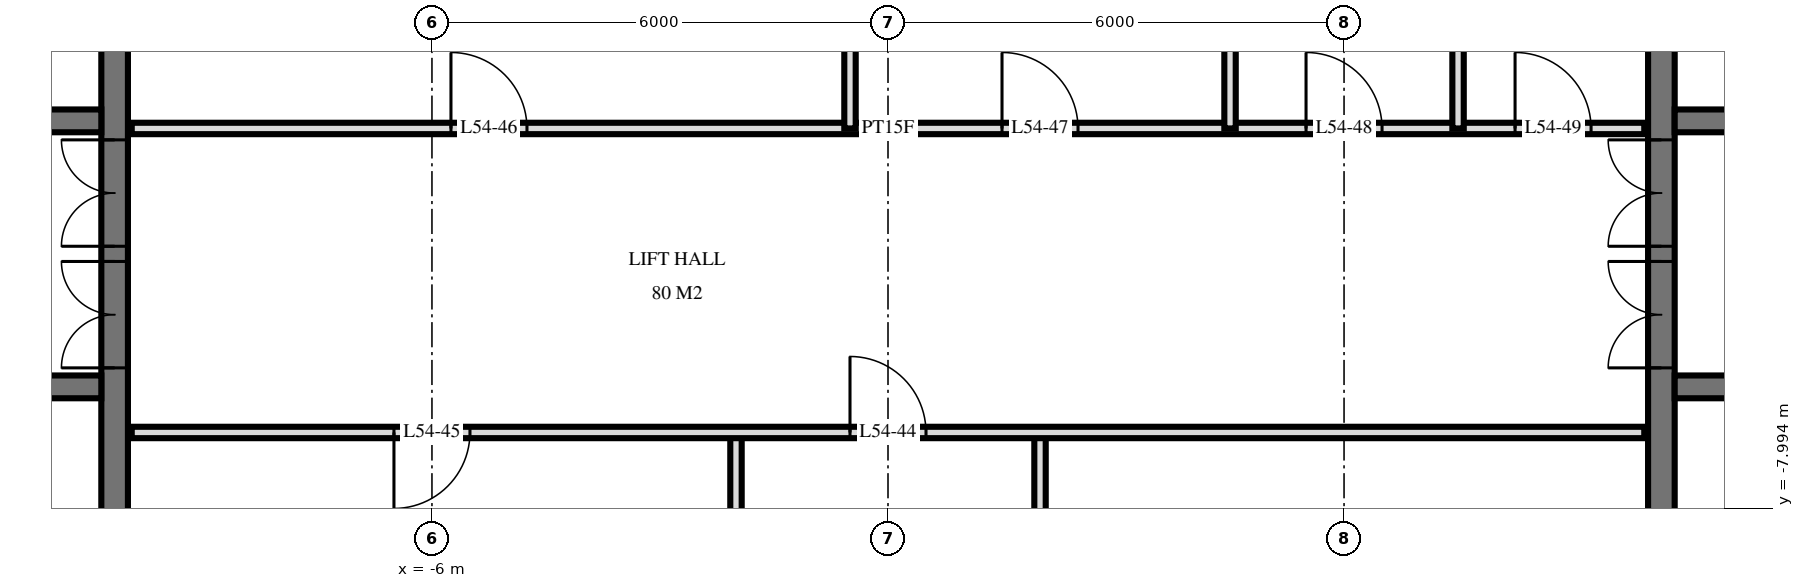
"""IFC4 building model, lengths in metres.
Left out: names, types, materials, properties, quantities, classifications, styles, units other than length and angle.
Written with IfcOpenShell. Run it as: python <this file> out.ifc"""

import sys

from ifc_helpers import new_model, si_unit, direction, frame, frame_2d, origin, place, context, subcontext, project, spatial, rectangle, extrude, element, fill, save


model = new_model("IFC4")
c1 = context("Model", 3, precision=1e-05, world=origin(), true_north=direction((0.0, 1.0)))
c2 = subcontext(c1, "Body", "Model", "MODEL_VIEW")
j1 = project(units=[si_unit("LENGTHUNIT", "METRE"), si_unit("PLANEANGLEUNIT", "RADIAN")], contexts=[c1])
p1 = place(None, origin())
s1 = spatial("IfcSite", under=j1, at=p1, CompositionType="ELEMENT")
p2 = place(p1, origin())
s2 = spatial("IfcBuilding", under=s1, at=p2, CompositionType="ELEMENT")
p3 = place(p2, frame((0.0, 0.0, 208.1)))
s3 = spatial("IfcBuildingStorey", under=s2, at=p3, CompositionType="ELEMENT", Elevation=208.1)
p4 = place(p3, frame((-10.175, -14.55, 0.0), z_axis=(0.0, 0.0, 1.0), x_axis=(0.0, 1.0, 0.0)))
e1 = element("IfcWall", 1, at=p4, inside=s3, PredefinedType="SHEAR", context=c2, shape_type="SweptSolid", body=[
    extrude(rectangle(XDim=14.1, YDim=0.35, at=frame_2d((7.05, 0.0))), origin(), (0.0, 0.0, 1.0), 3.5),
])
p5 = place(p4, frame((8.4, 0.0, 0.0)))
e2 = element("IfcOpeningElement", 2, at=p5, cuts=e1, PredefinedType="OPENING", context=c2, shape_type="SweptSolid", body=[
    extrude(rectangle(XDim=1.4, YDim=2.4, at=frame_2d((0.7, 1.2))), frame((0.0, 0.185, 0.0), z_axis=(0.0, -1.0, 0.0), x_axis=(1.0, 0.0, 0.0)), (0.0, 0.0, 1.0), 0.37),
])
p6 = place(p4, frame((10.0, 0.0, 0.0)))
e3 = element("IfcOpeningElement", 3, at=p6, cuts=e1, PredefinedType="OPENING", context=c2, shape_type="SweptSolid", body=[
    extrude(rectangle(XDim=1.4, YDim=2.4, at=frame_2d((0.7, 1.2))), frame((0.0, 0.185, 0.0), z_axis=(0.0, -1.0, 0.0), x_axis=(1.0, 0.0, 0.0)), (0.0, 0.0, 1.0), 0.37),
])
p7 = place(p4, frame((4.0, 0.0, 0.0)))
e4 = element("IfcOpeningElement", 4, at=p7, cuts=e1, PredefinedType="OPENING", context=c2, shape_type="SweptSolid", body=[
    extrude(rectangle(XDim=1.2, YDim=2.1, at=frame_2d((0.6, 1.05))), frame((0.0, 0.185, 0.0), z_axis=(0.0, -1.0, 0.0), x_axis=(1.0, 0.0, 0.0)), (0.0, 0.0, 1.0), 0.37),
])
p8 = place(p3, frame((-24.05, -2.9, 0.0), z_axis=(0.0, 0.0, 1.0), x_axis=(1.0, 0.0, 0.0)))
e5 = element("IfcWall", 5, at=p8, inside=s3, PredefinedType="SHEAR", context=c2, shape_type="SweptSolid", body=[
    extrude(rectangle(XDim=13.7, YDim=0.3, at=frame_2d((6.85, 0.0))), origin(), (0.0, 0.0, 1.0), 3.5),
])
p9 = place(p8, frame((0.55, 0.0, 0.0)))
e6 = element("IfcOpeningElement", 6, at=p9, cuts=e5, PredefinedType="OPENING", context=c2, shape_type="SweptSolid", body=[
    extrude(rectangle(XDim=1.1, YDim=2.1, at=frame_2d((0.55, 1.05))), frame((0.0, 0.16, 0.0), z_axis=(0.0, -1.0, 0.0), x_axis=(1.0, 0.0, 0.0)), (0.0, 0.0, 1.0), 0.32),
])
p10 = place(p8, frame((6.863, 0.0, 0.0)))
e7 = element("IfcOpeningElement", 7, at=p10, cuts=e5, PredefinedType="OPENING", context=c2, shape_type="SweptSolid", body=[
    extrude(rectangle(XDim=0.9, YDim=2.1, at=frame_2d((0.45, 1.05))), frame((0.0, 0.16, 0.0), z_axis=(0.0, -1.0, 0.0), x_axis=(1.0, 0.0, 0.0)), (0.0, 0.0, 1.0), 0.32),
])
p11 = place(p8, frame((5.438, 0.0, 0.0)))
e8 = element("IfcOpeningElement", 8, at=p11, cuts=e5, PredefinedType="OPENING", context=c2, shape_type="SweptSolid", body=[
    extrude(rectangle(XDim=0.9, YDim=2.1, at=frame_2d((0.45, 1.05))), frame((0.0, 0.16, 0.0), z_axis=(0.0, -1.0, 0.0), x_axis=(1.0, 0.0, 0.0)), (0.0, 0.0, 1.0), 0.32),
])
p12 = place(p8, frame((11.85, 0.0, 0.0)))
e9 = element("IfcOpeningElement", 9, at=p12, cuts=e5, PredefinedType="OPENING", context=c2, shape_type="SweptSolid", body=[
    extrude(rectangle(XDim=1.0, YDim=2.1, at=frame_2d((0.5, 1.05))), frame((0.0, 0.16, 0.0), z_axis=(0.0, -1.0, 0.0), x_axis=(1.0, 0.0, 0.0)), (0.0, 0.0, 1.0), 0.32),
])
p13 = place(p8, frame((9.562, 0.0, 0.0)))
e10 = element("IfcOpeningElement", 10, at=p13, cuts=e5, PredefinedType="OPENING", context=c2, shape_type="SweptSolid", body=[
    extrude(rectangle(XDim=1.0, YDim=2.1, at=frame_2d((0.5, 1.05))), frame((0.0, 0.16, 0.0), z_axis=(0.0, -1.0, 0.0), x_axis=(1.0, 0.0, 0.0)), (0.0, 0.0, 1.0), 0.32),
])
p14 = place(p8, frame((8.137, 0.0, 0.0)))
e11 = element("IfcOpeningElement", 11, at=p14, cuts=e5, PredefinedType="OPENING", context=c2, shape_type="SweptSolid", body=[
    extrude(rectangle(XDim=1.0, YDim=2.1, at=frame_2d((0.5, 1.05))), frame((0.0, 0.16, 0.0), z_axis=(0.0, -1.0, 0.0), x_axis=(1.0, 0.0, 0.0)), (0.0, 0.0, 1.0), 0.32),
])
p15 = place(p8, frame((3.0, 0.0, 0.0)))
e12 = element("IfcOpeningElement", 12, at=p15, cuts=e5, PredefinedType="OPENING", context=c2, shape_type="SweptSolid", body=[
    extrude(rectangle(XDim=1.0, YDim=2.1, at=frame_2d((0.5, 1.05))), frame((0.0, 0.16, 0.0), z_axis=(0.0, -1.0, 0.0), x_axis=(1.0, 0.0, 0.0)), (0.0, 0.0, 1.0), 0.32),
])
p16 = place(p3, frame((-24.05, -6.4, 0.0), z_axis=(0.0, 0.0, 1.0), x_axis=(1.0, 0.0, 0.0)))
e13 = element("IfcWall", 13, at=p16, inside=s3, PredefinedType="SHEAR", context=c2, shape_type="SweptSolid", body=[
    extrude(rectangle(XDim=13.7, YDim=0.3, at=frame_2d((6.85, 0.0))), origin(), (0.0, 0.0, 1.0), 3.5),
])
p17 = place(p16, frame((0.55, 0.0, 0.0)))
e14 = element("IfcOpeningElement", 14, at=p17, cuts=e13, PredefinedType="OPENING", context=c2, shape_type="SweptSolid", body=[
    extrude(rectangle(XDim=1.1, YDim=2.1, at=frame_2d((0.55, 1.05))), frame((0.0, 0.16, 0.0), z_axis=(0.0, -1.0, 0.0), x_axis=(1.0, 0.0, 0.0)), (0.0, 0.0, 1.0), 0.32),
])
p18 = place(p16, frame((5.8, 0.0, 0.0)))
e15 = element("IfcOpeningElement", 15, at=p18, cuts=e13, PredefinedType="OPENING", context=c2, shape_type="SweptSolid", body=[
    extrude(rectangle(XDim=1.1, YDim=2.1, at=frame_2d((0.55, 1.05))), frame((0.0, 0.16, 0.0), z_axis=(0.0, -1.0, 0.0), x_axis=(1.0, 0.0, 0.0)), (0.0, 0.0, 1.0), 0.32),
])
p19 = place(p3, frame((10.175, -14.55, 0.0), z_axis=(0.0, 0.0, 1.0), x_axis=(0.0, 1.0, 0.0)))
e16 = element("IfcWall", 16, at=p19, inside=s3, PredefinedType="SHEAR", context=c2, shape_type="SweptSolid", body=[
    extrude(rectangle(XDim=14.1, YDim=0.35, at=frame_2d((7.05, 0.0))), origin(), (0.0, 0.0, 1.0), 3.5),
])
p20 = place(p19, frame((8.4, 0.0, 0.0)))
e17 = element("IfcOpeningElement", 17, at=p20, cuts=e16, PredefinedType="OPENING", context=c2, shape_type="SweptSolid", body=[
    extrude(rectangle(XDim=1.4, YDim=2.4, at=frame_2d((0.7, 1.2))), frame((0.0, 0.185, 0.0), z_axis=(0.0, -1.0, 0.0), x_axis=(1.0, 0.0, 0.0)), (0.0, 0.0, 1.0), 0.37),
])
p21 = place(p19, frame((10.0, 0.0, 0.0)))
e18 = element("IfcOpeningElement", 18, at=p21, cuts=e16, PredefinedType="OPENING", context=c2, shape_type="SweptSolid", body=[
    extrude(rectangle(XDim=1.4, YDim=2.4, at=frame_2d((0.7, 1.2))), frame((0.0, 0.185, 0.0), z_axis=(0.0, -1.0, 0.0), x_axis=(1.0, 0.0, 0.0)), (0.0, 0.0, 1.0), 0.37),
])
p22 = place(p19, frame((4.0, 0.0, 0.0)))
e19 = element("IfcOpeningElement", 19, at=p22, cuts=e16, PredefinedType="OPENING", context=c2, shape_type="SweptSolid", body=[
    extrude(rectangle(XDim=1.2, YDim=2.1, at=frame_2d((0.6, 1.05))), frame((0.0, 0.185, 0.0), z_axis=(0.0, -1.0, 0.0), x_axis=(1.0, 0.0, 0.0)), (0.0, 0.0, 1.0), 0.37),
])
p23 = place(p3, frame((10.35, -2.9, 0.0), z_axis=(0.0, 0.0, 1.0), x_axis=(1.0, 0.0, 0.0)))
e20 = element("IfcWall", 20, at=p23, inside=s3, PredefinedType="SHEAR", context=c2, shape_type="SweptSolid", body=[
    extrude(rectangle(XDim=13.7, YDim=0.3, at=frame_2d((6.85, 0.0))), origin(), (0.0, 0.0, 1.0), 3.5),
])
p24 = place(p23, frame((12.05, 0.0, 0.0)))
e21 = element("IfcOpeningElement", 21, at=p24, cuts=e20, PredefinedType="OPENING", context=c2, shape_type="SweptSolid", body=[
    extrude(rectangle(XDim=1.1, YDim=2.1, at=frame_2d((0.55, 1.05))), frame((0.0, 0.16, 0.0), z_axis=(0.0, -1.0, 0.0), x_axis=(1.0, 0.0, 0.0)), (0.0, 0.0, 1.0), 0.32),
])
p25 = place(p23, frame((5.938, 0.0, 0.0)))
e22 = element("IfcOpeningElement", 22, at=p25, cuts=e20, PredefinedType="OPENING", context=c2, shape_type="SweptSolid", body=[
    extrude(rectangle(XDim=0.9, YDim=2.1, at=frame_2d((0.45, 1.05))), frame((0.0, 0.16, 0.0), z_axis=(0.0, -1.0, 0.0), x_axis=(1.0, 0.0, 0.0)), (0.0, 0.0, 1.0), 0.32),
])
p26 = place(p23, frame((7.363, 0.0, 0.0)))
e23 = element("IfcOpeningElement", 23, at=p26, cuts=e20, PredefinedType="OPENING", context=c2, shape_type="SweptSolid", body=[
    extrude(rectangle(XDim=0.9, YDim=2.1, at=frame_2d((0.45, 1.05))), frame((0.0, 0.16, 0.0), z_axis=(0.0, -1.0, 0.0), x_axis=(1.0, 0.0, 0.0)), (0.0, 0.0, 1.0), 0.32),
])
p27 = place(p23, frame((0.85, 0.0, 0.0)))
e24 = element("IfcOpeningElement", 24, at=p27, cuts=e20, PredefinedType="OPENING", context=c2, shape_type="SweptSolid", body=[
    extrude(rectangle(XDim=1.0, YDim=2.1, at=frame_2d((0.5, 1.05))), frame((0.0, 0.16, 0.0), z_axis=(0.0, -1.0, 0.0), x_axis=(1.0, 0.0, 0.0)), (0.0, 0.0, 1.0), 0.32),
])
p28 = place(p23, frame((3.137, 0.0, 0.0)))
e25 = element("IfcOpeningElement", 25, at=p28, cuts=e20, PredefinedType="OPENING", context=c2, shape_type="SweptSolid", body=[
    extrude(rectangle(XDim=1.0, YDim=2.1, at=frame_2d((0.5, 1.05))), frame((0.0, 0.16, 0.0), z_axis=(0.0, -1.0, 0.0), x_axis=(1.0, 0.0, 0.0)), (0.0, 0.0, 1.0), 0.32),
])
p29 = place(p23, frame((4.562, 0.0, 0.0)))
e26 = element("IfcOpeningElement", 26, at=p29, cuts=e20, PredefinedType="OPENING", context=c2, shape_type="SweptSolid", body=[
    extrude(rectangle(XDim=1.0, YDim=2.1, at=frame_2d((0.5, 1.05))), frame((0.0, 0.16, 0.0), z_axis=(0.0, -1.0, 0.0), x_axis=(1.0, 0.0, 0.0)), (0.0, 0.0, 1.0), 0.32),
])
p30 = place(p23, frame((9.7, 0.0, 0.0)))
e27 = element("IfcOpeningElement", 27, at=p30, cuts=e20, PredefinedType="OPENING", context=c2, shape_type="SweptSolid", body=[
    extrude(rectangle(XDim=1.0, YDim=2.1, at=frame_2d((0.5, 1.05))), frame((0.0, 0.16, 0.0), z_axis=(0.0, -1.0, 0.0), x_axis=(1.0, 0.0, 0.0)), (0.0, 0.0, 1.0), 0.32),
])
p31 = place(p3, frame((10.35, -6.4, 0.0), z_axis=(0.0, 0.0, 1.0), x_axis=(1.0, 0.0, 0.0)))
e28 = element("IfcWall", 28, at=p31, inside=s3, PredefinedType="SHEAR", context=c2, shape_type="SweptSolid", body=[
    extrude(rectangle(XDim=13.7, YDim=0.3, at=frame_2d((6.85, 0.0))), origin(), (0.0, 0.0, 1.0), 3.5),
])
p32 = place(p31, frame((12.05, 0.0, 0.0)))
e29 = element("IfcOpeningElement", 29, at=p32, cuts=e28, PredefinedType="OPENING", context=c2, shape_type="SweptSolid", body=[
    extrude(rectangle(XDim=1.1, YDim=2.1, at=frame_2d((0.55, 1.05))), frame((0.0, 0.16, 0.0), z_axis=(0.0, -1.0, 0.0), x_axis=(1.0, 0.0, 0.0)), (0.0, 0.0, 1.0), 0.32),
])
p33 = place(p31, frame((6.8, 0.0, 0.0)))
e30 = element("IfcOpeningElement", 30, at=p33, cuts=e28, PredefinedType="OPENING", context=c2, shape_type="SweptSolid", body=[
    extrude(rectangle(XDim=1.1, YDim=2.1, at=frame_2d((0.55, 1.05))), frame((0.0, 0.16, 0.0), z_axis=(0.0, -1.0, 0.0), x_axis=(1.0, 0.0, 0.0)), (0.0, 0.0, 1.0), 0.32),
])
for number, where, z_axis, x_axis in (
    (31, (7.5, -3.0, 0.0), (0.0, 0.0, 1.0), (0.0, 1.0, 0.0)),
    (32, (4.5, -3.0, 0.0), (0.0, 0.0, 1.0), (0.0, 1.0, 0.0)),
):
    element("IfcWall", number, at=place(p3, frame(where, z_axis=z_axis, x_axis=x_axis)), inside=s3, PredefinedType="PLUMBINGWALL", context=c2, shape_type="SweptSolid", body=[
        extrude(rectangle(XDim=4.02, YDim=0.15, at=frame_2d((2.01, 0.0))), origin(), (0.0, 0.0, 1.0), 3.22),
    ])
p34 = place(p3, frame((2.0, -11.0, 0.0), z_axis=(0.0, 0.0, 1.0), x_axis=(0.0, 1.0, 0.0)))
e33 = element("IfcWall", 33, at=p34, inside=s3, PredefinedType="PARTITIONING", context=c2, shape_type="SweptSolid", body=[
    extrude(rectangle(XDim=4.0, YDim=0.15, at=frame_2d((2.0, 0.0))), origin(), (0.0, 0.0, 1.0), 3.22),
])
p35 = place(p3, frame((-0.5, -3.0, 0.0), z_axis=(0.0, 0.0, 1.0), x_axis=(0.0, 1.0, 0.0)))
e34 = element("IfcWall", 34, at=p35, inside=s3, PredefinedType="PARTITIONING", context=c2, shape_type="SweptSolid", body=[
    extrude(rectangle(XDim=4.02, YDim=0.15, at=frame_2d((2.01, 0.0))), origin(), (0.0, 0.0, 1.0), 3.22),
])
p36 = place(p3, frame((-2.0, -11.0, 0.0), z_axis=(0.0, 0.0, 1.0), x_axis=(0.0, 1.0, 0.0)))
e35 = element("IfcWall", 35, at=p36, inside=s3, PredefinedType="PARTITIONING", context=c2, shape_type="SweptSolid", body=[
    extrude(rectangle(XDim=4.0, YDim=0.15, at=frame_2d((2.0, 0.0))), origin(), (0.0, 0.0, 1.0), 3.22),
])
p37 = place(p3, frame((-9.95, -7.0, 0.0), z_axis=(0.0, 0.0, 1.0), x_axis=(1.0, 0.0, 0.0)))
e36 = element("IfcWall", 36, at=p37, inside=s3, PredefinedType="PARTITIONING", context=c2, shape_type="SweptSolid", body=[
    extrude(rectangle(XDim=19.9, YDim=0.15, at=frame_2d((9.95, 0.0))), origin(), (0.0, 0.0, 1.0), 3.22),
])
p38 = place(p37, frame((9.45, 0.0, 0.0)))
e37 = element("IfcOpeningElement", 37, at=p38, cuts=e36, PredefinedType="OPENING", context=c2, shape_type="SweptSolid", body=[
    extrude(rectangle(XDim=1.0, YDim=2.1, at=frame_2d((0.5, 1.05))), frame((0.0, 0.085, 0.0), z_axis=(0.0, -1.0, 0.0), x_axis=(1.0, 0.0, 0.0)), (0.0, 0.0, 1.0), 0.17),
])
p39 = place(p37, frame((3.45, 0.0, 0.0)))
e38 = element("IfcOpeningElement", 38, at=p39, cuts=e36, PredefinedType="OPENING", context=c2, shape_type="SweptSolid", body=[
    extrude(rectangle(XDim=1.0, YDim=2.1, at=frame_2d((0.5, 1.05))), frame((0.0, 0.085, 0.0), z_axis=(0.0, -1.0, 0.0), x_axis=(1.0, 0.0, 0.0)), (0.0, 0.0, 1.0), 0.17),
])
p40 = place(p3, frame((-9.95, -3.0, 0.0), z_axis=(0.0, 0.0, 1.0), x_axis=(1.0, 0.0, 0.0)))
e39 = element("IfcWall", 39, at=p40, inside=s3, PredefinedType="PARTITIONING", context=c2, shape_type="SweptSolid", body=[
    extrude(rectangle(XDim=19.9, YDim=0.15, at=frame_2d((9.95, 0.0))), origin(), (0.0, 0.0, 1.0), 3.22),
])
p41 = place(p40, frame((4.2, 0.0, 0.0)))
e40 = element("IfcOpeningElement", 40, at=p41, cuts=e39, PredefinedType="OPENING", context=c2, shape_type="SweptSolid", body=[
    extrude(rectangle(XDim=1.0, YDim=2.1, at=frame_2d((0.5, 1.05))), frame((0.0, 0.085, 0.0), z_axis=(0.0, -1.0, 0.0), x_axis=(1.0, 0.0, 0.0)), (0.0, 0.0, 1.0), 0.17),
])
p42 = place(p40, frame((11.45, 0.0, 0.0)))
e41 = element("IfcOpeningElement", 41, at=p42, cuts=e39, PredefinedType="OPENING", context=c2, shape_type="SweptSolid", body=[
    extrude(rectangle(XDim=1.0, YDim=2.1, at=frame_2d((0.5, 1.05))), frame((0.0, 0.085, 0.0), z_axis=(0.0, -1.0, 0.0), x_axis=(1.0, 0.0, 0.0)), (0.0, 0.0, 1.0), 0.17),
])
p43 = place(p40, frame((15.45, 0.0, 0.0)))
e42 = element("IfcOpeningElement", 42, at=p43, cuts=e39, PredefinedType="OPENING", context=c2, shape_type="SweptSolid", body=[
    extrude(rectangle(XDim=1.0, YDim=2.1, at=frame_2d((0.5, 1.05))), frame((0.0, 0.085, 0.0), z_axis=(0.0, -1.0, 0.0), x_axis=(1.0, 0.0, 0.0)), (0.0, 0.0, 1.0), 0.17),
])
p44 = place(p40, frame((18.2, 0.0, 0.0)))
e43 = element("IfcOpeningElement", 43, at=p44, cuts=e39, PredefinedType="OPENING", context=c2, shape_type="SweptSolid", body=[
    extrude(rectangle(XDim=1.0, YDim=2.1, at=frame_2d((0.5, 1.05))), frame((0.0, 0.085, 0.0), z_axis=(0.0, -1.0, 0.0), x_axis=(1.0, 0.0, 0.0)), (0.0, 0.0, 1.0), 0.17),
])
p45 = place(p5, origin())
e44 = element("IfcDoor", 44, at=p45, inside=s3, OperationType="DOUBLE_DOOR_SINGLE_SWING", PredefinedType="DOOR", context=c2, shape_type="SweptSolid", body=[
    extrude(rectangle(XDim=1.4, YDim=2.4, at=frame_2d((0.7, 1.2))), frame((0.0, 0.025, 0.0), z_axis=(0.0, -1.0, 0.0), x_axis=(1.0, 0.0, 0.0)), (0.0, 0.0, 1.0), 0.05),
])
fill(e2, e44)
p46 = place(p6, origin())
e45 = element("IfcDoor", 45, at=p46, inside=s3, OperationType="DOUBLE_DOOR_SINGLE_SWING", PredefinedType="DOOR", context=c2, shape_type="SweptSolid", body=[
    extrude(rectangle(XDim=1.4, YDim=2.4, at=frame_2d((0.7, 1.2))), frame((0.0, 0.025, 0.0), z_axis=(0.0, -1.0, 0.0), x_axis=(1.0, 0.0, 0.0)), (0.0, 0.0, 1.0), 0.05),
])
fill(e3, e45)
p47 = place(p20, origin())
e46 = element("IfcDoor", 46, at=p47, inside=s3, OperationType="DOUBLE_DOOR_SINGLE_SWING", PredefinedType="DOOR", context=c2, shape_type="SweptSolid", body=[
    extrude(rectangle(XDim=1.4, YDim=2.4, at=frame_2d((0.7, 1.2))), frame((0.0, 0.025, 0.0), z_axis=(0.0, -1.0, 0.0), x_axis=(1.0, 0.0, 0.0)), (0.0, 0.0, 1.0), 0.05),
])
fill(e17, e46)
p48 = place(p21, origin())
e47 = element("IfcDoor", 47, at=p48, inside=s3, OperationType="DOUBLE_DOOR_SINGLE_SWING", PredefinedType="DOOR", context=c2, shape_type="SweptSolid", body=[
    extrude(rectangle(XDim=1.4, YDim=2.4, at=frame_2d((0.7, 1.2))), frame((0.0, 0.025, 0.0), z_axis=(0.0, -1.0, 0.0), x_axis=(1.0, 0.0, 0.0)), (0.0, 0.0, 1.0), 0.05),
])
fill(e18, e47)
p49 = place(p38, origin())
e48 = element("IfcDoor", 48, at=p49, inside=s3, OperationType="SINGLE_SWING_RIGHT", PredefinedType="DOOR", context=c2, shape_type="SweptSolid", body=[
    extrude(rectangle(XDim=1.0, YDim=2.1, at=frame_2d((0.5, 1.05))), frame((0.0, 0.025, 0.0), z_axis=(0.0, -1.0, 0.0), x_axis=(1.0, 0.0, 0.0)), (0.0, 0.0, 1.0), 0.05),
])
fill(e37, e48)
p50 = place(p39, frame((0.5, 0.0, 0.0), z_axis=(0.0, 0.0, 1.0), x_axis=(-1.0, 0.0, 0.0)))
e49 = element("IfcDoor", 49, at=p50, inside=s3, OperationType="SINGLE_SWING_LEFT", PredefinedType="DOOR", context=c2, shape_type="SweptSolid", body=[
    extrude(rectangle(XDim=1.0, YDim=2.1, at=frame_2d((0.0, 1.05))), frame((0.0, -0.025, 0.0), z_axis=(0.0, 1.0, 0.0), x_axis=(-1.0, 0.0, 0.0)), (0.0, 0.0, 1.0), 0.05),
])
fill(e38, e49)
p51 = place(p41, origin())
e50 = element("IfcDoor", 50, at=p51, inside=s3, OperationType="SINGLE_SWING_RIGHT", PredefinedType="DOOR", context=c2, shape_type="SweptSolid", body=[
    extrude(rectangle(XDim=1.0, YDim=2.1, at=frame_2d((0.5, 1.05))), frame((0.0, 0.025, 0.0), z_axis=(0.0, -1.0, 0.0), x_axis=(1.0, 0.0, 0.0)), (0.0, 0.0, 1.0), 0.05),
])
fill(e40, e50)
p52 = place(p42, origin())
e51 = element("IfcDoor", 51, at=p52, inside=s3, OperationType="SINGLE_SWING_RIGHT", PredefinedType="DOOR", context=c2, shape_type="SweptSolid", body=[
    extrude(rectangle(XDim=1.0, YDim=2.1, at=frame_2d((0.5, 1.05))), frame((0.0, 0.025, 0.0), z_axis=(0.0, -1.0, 0.0), x_axis=(1.0, 0.0, 0.0)), (0.0, 0.0, 1.0), 0.05),
])
fill(e41, e51)
p53 = place(p43, origin())
e52 = element("IfcDoor", 52, at=p53, inside=s3, OperationType="SINGLE_SWING_RIGHT", PredefinedType="DOOR", context=c2, shape_type="SweptSolid", body=[
    extrude(rectangle(XDim=1.0, YDim=2.1, at=frame_2d((0.5, 1.05))), frame((0.0, 0.025, 0.0), z_axis=(0.0, -1.0, 0.0), x_axis=(1.0, 0.0, 0.0)), (0.0, 0.0, 1.0), 0.05),
])
fill(e42, e52)
p54 = place(p44, origin())
e53 = element("IfcDoor", 53, at=p54, inside=s3, OperationType="SINGLE_SWING_RIGHT", PredefinedType="DOOR", context=c2, shape_type="SweptSolid", body=[
    extrude(rectangle(XDim=1.0, YDim=2.1, at=frame_2d((0.5, 1.05))), frame((0.0, 0.025, 0.0), z_axis=(0.0, -1.0, 0.0), x_axis=(1.0, 0.0, 0.0)), (0.0, 0.0, 1.0), 0.05),
])
fill(e43, e53)
save(model, sys.argv[1])
